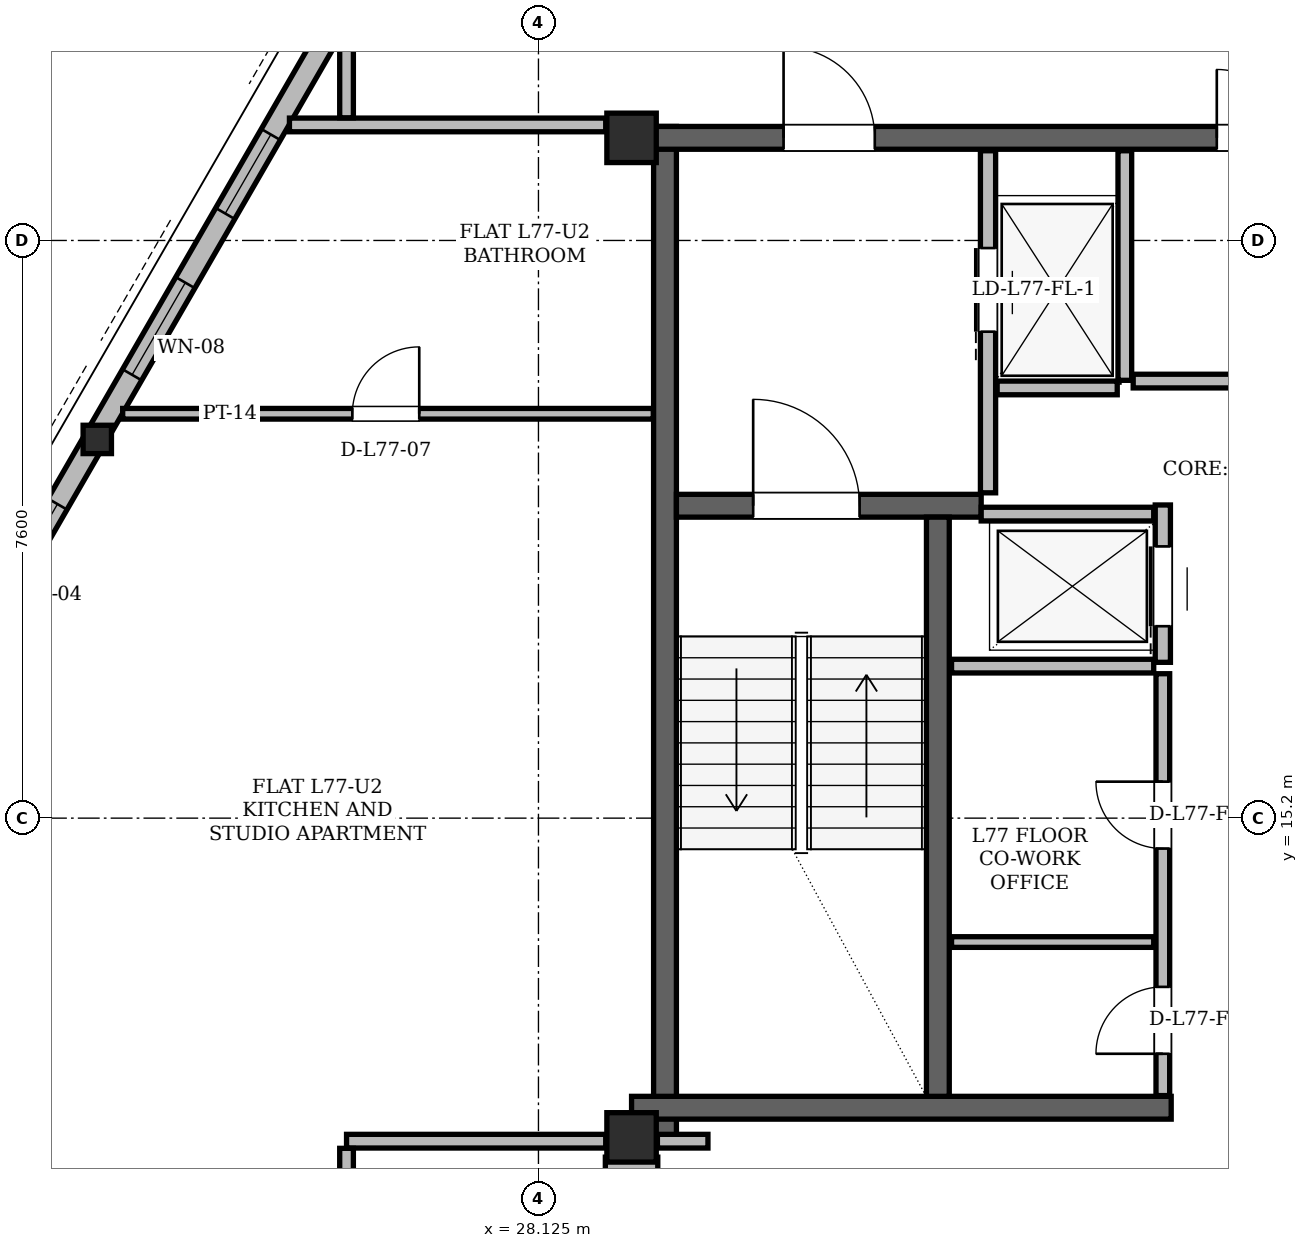
"""IFC4 building model, lengths in metres.
Left out: names, types, materials, properties, quantities, classifications, styles, units other than length and angle.
Written with IfcOpenShell. Run it as: python <this file> out.ifc"""

import sys

from ifc_helpers import new_model, si_unit, direction, frame, frame_2d, origin, origin_2d, place, context, subcontext, project, spatial, rectangle, hollow_rectangle, i_section, extrude, element, fill, save


model = new_model("IFC4")
c1 = context("Model", 3, precision=1e-05, world=origin(), true_north=direction((0.0, 1.0)))
c2 = subcontext(c1, "Body", "Model", "MODEL_VIEW")
j1 = project(units=[si_unit("LENGTHUNIT", "METRE"), si_unit("PLANEANGLEUNIT", "RADIAN")], contexts=[c1])
p1 = place(None, origin())
s1 = spatial("IfcSite", under=j1, at=p1, CompositionType="ELEMENT")
p2 = place(p1, origin())
s2 = spatial("IfcBuilding", under=s1, at=p2, CompositionType="ELEMENT")
p3 = place(p2, frame((0.0, 0.0, 292.8)))
s3 = spatial("IfcBuildingStorey", under=s2, at=p3, CompositionType="ELEMENT", Elevation=292.8)
for number, where, z_axis, x_axis in (
    (1, (29.35, 11.0, 0.0), (0.0, 0.0, 1.0), (1.0, 0.0, 0.0)),
    (2, (29.35, 24.15, 0.0), (0.0, 0.0, 1.0), (1.0, 0.0, 0.0)),
):
    element("IfcColumn", number, at=place(p3, frame(where, z_axis=z_axis, x_axis=x_axis)), inside=s3, PredefinedType="COLUMN", context=c2, shape_type="SweptSolid", body=[
        extrude(hollow_rectangle(XDim=0.65, YDim=0.65, WallThickness=0.05, at=origin_2d()), origin(), (0.0, 0.0, 1.0), 3.9),
    ])
p4 = place(p3, frame((22.298, 20.2, 0.004), z_axis=(0.011543475667, -0.009222233277, 0.999890843334), x_axis=(0.624177092803, 0.781282891672, 0.0)))
e3 = element("IfcColumn", 3, at=p4, inside=s3, PredefinedType="COLUMN", context=c2, shape_type="SweptSolid", body=[
    extrude(i_section(OverallWidth=0.373, OverallDepth=0.373, WebThickness=0.016, FlangeThickness=0.026, at=origin_2d()), origin(), (0.0, 0.0, 1.0), 3.892),
])
p5 = place(p3, frame((29.79, 11.0, 0.0), z_axis=(0.0, 0.0, 1.0), x_axis=(0.0, 1.0, 0.0)))
e4 = element("IfcWall", 4, at=p5, inside=s3, PredefinedType="SHEAR", context=c2, shape_type="SweptSolid", body=[
    extrude(rectangle(XDim=13.3, YDim=0.3, at=frame_2d((6.65, 0.0))), origin(), (0.0, 0.0, 1.0), 3.68),
])
p6 = place(p3, frame((29.35, 11.39, 0.0), z_axis=(0.0, 0.0, 1.0), x_axis=(1.0, 0.0, 0.0)))
e5 = element("IfcWall", 5, at=p6, inside=s3, PredefinedType="SHEAR", context=c2, shape_type="SweptSolid", body=[
    extrude(rectangle(XDim=7.1, YDim=0.3, at=frame_2d((3.55, 0.0))), origin(), (0.0, 0.0, 1.0), 3.68),
])
p7 = place(p3, frame((29.65, 24.15, 0.0), z_axis=(0.0, 0.0, 1.0), x_axis=(1.0, 0.0, 0.0)))
e6 = element("IfcWall", 6, at=p7, inside=s3, PredefinedType="SHEAR", context=c2, shape_type="SweptSolid", body=[
    extrude(rectangle(XDim=15.7, YDim=0.3, at=frame_2d((7.85, 0.0))), origin(), (0.0, 0.0, 1.0), 3.68),
])
p8 = place(p7, frame((1.7, 0.0, 0.0)))
e7 = element("IfcOpeningElement", 7, at=p8, cuts=e6, PredefinedType="OPENING", context=c2, shape_type="SweptSolid", body=[
    extrude(rectangle(XDim=1.2, YDim=2.2, at=frame_2d((0.6, 1.1))), frame((0.0, 0.15, 0.0), z_axis=(0.0, -1.0, 0.0), x_axis=(1.0, 0.0, 0.0)), (0.0, 0.0, 1.0), 0.3),
])
p9 = place(p7, frame((12.8, 0.0, 0.0)))
e8 = element("IfcOpeningElement", 8, at=p9, cuts=e6, PredefinedType="OPENING", context=c2, shape_type="SweptSolid", body=[
    extrude(rectangle(XDim=1.2, YDim=2.2, at=frame_2d((0.6, 1.1))), frame((0.0, 0.15, 0.0), z_axis=(0.0, -1.0, 0.0), x_axis=(1.0, 0.0, 0.0)), (0.0, 0.0, 1.0), 0.3),
])
p10 = place(p7, frame((7.4, 0.0, 0.0)))
e9 = element("IfcOpeningElement", 9, at=p10, cuts=e6, PredefinedType="OPENING", context=c2, shape_type="SweptSolid", body=[
    extrude(rectangle(XDim=0.9, YDim=2.05, at=frame_2d((0.45, 1.025))), frame((0.0, 0.15, 0.0), z_axis=(0.0, -1.0, 0.0), x_axis=(1.0, 0.0, 0.0)), (0.0, 0.0, 1.0), 0.3),
])
p11 = place(p3, frame((29.94, 19.31, 0.0), z_axis=(0.0, 0.0, 1.0), x_axis=(1.0, 0.0, 0.0)))
e10 = element("IfcWall", 10, at=p11, inside=s3, PredefinedType="SHEAR", context=c2, shape_type="SweptSolid", body=[
    extrude(rectangle(XDim=4.01, YDim=0.3, at=frame_2d((2.005, 0.0))), origin(), (0.0, 0.0, 1.0), 3.68),
])
p12 = place(p11, frame((1.01, 0.0, 0.0)))
e11 = element("IfcOpeningElement", 11, at=p12, cuts=e10, PredefinedType="OPENING", context=c2, shape_type="SweptSolid", body=[
    extrude(rectangle(XDim=1.4, YDim=2.2, at=frame_2d((0.7, 1.1))), frame((0.0, 0.15, 0.0), z_axis=(0.0, -1.0, 0.0), x_axis=(1.0, 0.0, 0.0)), (0.0, 0.0, 1.0), 0.3),
])
p13 = place(p3, frame((33.38, 11.54, 0.0), z_axis=(0.0, 0.0, 1.0), x_axis=(0.0, 1.0, 0.0)))
e12 = element("IfcWall", 12, at=p13, inside=s3, PredefinedType="SHEAR", context=c2, shape_type="SweptSolid", body=[
    extrude(rectangle(XDim=7.62, YDim=0.3, at=frame_2d((3.81, 0.0))), origin(), (0.0, 0.0, 1.0), 3.68),
])
p14 = place(p3, frame((35.448, 42.976, 0.0), z_axis=(0.0, 0.0, 1.0), x_axis=(-0.499999767403, -0.866025538074, 0.0)))
e13 = element("IfcWall", 13, at=p14, inside=s3, PredefinedType="SOLIDWALL", context=c2, shape_type="SweptSolid", body=[
    extrude(rectangle(XDim=37.57, YDim=0.29, at=frame_2d((18.785, 0.0))), origin(), (0.0, 0.0, 1.0), 3.058),
])
p15 = place(p14, frame((8.034, 0.0, 0.0)))
e14 = element("IfcOpeningElement", 14, at=p15, cuts=e13, PredefinedType="OPENING", context=c2, shape_type="SweptSolid", body=[
    extrude(rectangle(XDim=1.5, YDim=2.2, at=frame_2d((0.75, 1.1))), frame((0.0, 0.145, 0.0), z_axis=(0.0, -1.0, 0.0), x_axis=(1.0, 0.0, 0.0)), (0.0, 0.0, 1.0), 0.29),
])
p16 = place(p14, frame((32.431, 0.0, 0.0)))
e15 = element("IfcOpeningElement", 15, at=p16, cuts=e13, PredefinedType="OPENING", context=c2, shape_type="SweptSolid", body=[
    extrude(rectangle(XDim=1.5, YDim=2.2, at=frame_2d((0.75, 1.1))), frame((0.0, 0.145, 0.0), z_axis=(0.0, -1.0, 0.0), x_axis=(1.0, 0.0, 0.0)), (0.0, 0.0, 1.0), 0.29),
])
p17 = place(p14, frame((27.302, 0.0, 0.85)))
e16 = element("IfcOpeningElement", 16, at=p17, cuts=e13, PredefinedType="OPENING", context=c2, shape_type="SweptSolid", body=[
    extrude(rectangle(XDim=2.2, YDim=1.85, at=frame_2d((1.1, 0.925))), frame((0.0, 0.145, 0.0), z_axis=(0.0, -1.0, 0.0), x_axis=(1.0, 0.0, 0.0)), (0.0, 0.0, 1.0), 0.29),
])
p18 = place(p14, frame((34.367, 0.0, 0.85)))
e17 = element("IfcOpeningElement", 17, at=p18, cuts=e13, PredefinedType="OPENING", context=c2, shape_type="SweptSolid", body=[
    extrude(rectangle(XDim=1.6, YDim=1.7, at=frame_2d((0.8, 0.85))), frame((0.0, 0.145, 0.0), z_axis=(0.0, -1.0, 0.0), x_axis=(1.0, 0.0, 0.0)), (0.0, 0.0, 1.0), 0.29),
])
p19 = place(p14, frame((21.688, 0.0, 0.85)))
e18 = element("IfcOpeningElement", 18, at=p19, cuts=e13, PredefinedType="OPENING", context=c2, shape_type="SweptSolid", body=[
    extrude(rectangle(XDim=1.2, YDim=1.48, at=frame_2d((0.6, 0.74))), frame((0.0, 0.145, 0.0), z_axis=(0.0, -1.0, 0.0), x_axis=(1.0, 0.0, 0.0)), (0.0, 0.0, 1.0), 0.29),
])
p20 = place(p14, frame((23.938, 0.0, 0.85)))
e19 = element("IfcOpeningElement", 19, at=p20, cuts=e13, PredefinedType="OPENING", context=c2, shape_type="SweptSolid", body=[
    extrude(rectangle(XDim=1.4, YDim=1.6, at=frame_2d((0.7, 0.8))), frame((0.0, 0.145, 0.0), z_axis=(0.0, -1.0, 0.0), x_axis=(1.0, 0.0, 0.0)), (0.0, 0.0, 1.0), 0.29),
])
p21 = place(p14, frame((15.363, 0.0, 0.85)))
e20 = element("IfcOpeningElement", 20, at=p21, cuts=e13, PredefinedType="OPENING", context=c2, shape_type="SweptSolid", body=[
    extrude(rectangle(XDim=2.4, YDim=1.9, at=frame_2d((1.2, 0.95))), frame((0.0, 0.145, 0.0), z_axis=(0.0, -1.0, 0.0), x_axis=(1.0, 0.0, 0.0)), (0.0, 0.0, 1.0), 0.29),
])
p22 = place(p14, frame((1.165, 0.0, 0.85)))
e21 = element("IfcOpeningElement", 21, at=p22, cuts=e13, PredefinedType="OPENING", context=c2, shape_type="SweptSolid", body=[
    extrude(rectangle(XDim=1.2, YDim=1.48, at=frame_2d((0.6, 0.74))), frame((0.0, 0.145, 0.0), z_axis=(0.0, -1.0, 0.0), x_axis=(1.0, 0.0, 0.0)), (0.0, 0.0, 1.0), 0.29),
])
p23 = place(p3, frame((34.04, 19.48, 0.0), z_axis=(0.0, 0.0, 1.0), x_axis=(0.0, 1.0, 0.0)))
e22 = element("IfcWall", 22, at=p23, inside=s3, PredefinedType="PARTITIONING", context=c2, shape_type="SweptSolid", body=[
    extrude(rectangle(XDim=4.5, YDim=0.2, at=frame_2d((2.25, 0.0))), origin(), (0.0, 0.0, 1.0), 3.68),
])
p24 = place(p23, frame((2.12, 0.0, 0.0)))
e23 = element("IfcOpeningElement", 23, at=p24, cuts=e22, PredefinedType="OPENING", context=c2, shape_type="SweptSolid", body=[
    extrude(rectangle(XDim=1.1, YDim=2.2, at=frame_2d((0.55, 1.1))), frame((0.0, 0.1, 0.0), z_axis=(0.0, -1.0, 0.0), x_axis=(1.0, 0.0, 0.0)), (0.0, 0.0, 1.0), 0.2),
])
p25 = place(p3, frame((35.84, 20.96, 0.0), z_axis=(0.0, 0.0, 1.0), x_axis=(0.0, 1.0, 0.0)))
e24 = element("IfcWall", 24, at=p25, inside=s3, PredefinedType="PARTITIONING", context=c2, shape_type="SweptSolid", body=[
    extrude(rectangle(XDim=3.02, YDim=0.18, at=frame_2d((1.51, 0.0))), origin(), (0.0, 0.0, 1.0), 3.68),
])
p26 = place(p3, frame((34.16, 20.86, 0.0), z_axis=(0.0, 0.0, 1.0), x_axis=(1.0, 0.0, 0.0)))
e25 = element("IfcWall", 25, at=p26, inside=s3, PredefinedType="PARTITIONING", context=c2, shape_type="SweptSolid", body=[
    extrude(rectangle(XDim=1.58, YDim=0.18, at=frame_2d((0.79, 0.0))), origin(), (0.0, 0.0, 1.0), 3.68),
])
p27 = place(p3, frame((36.34, 17.25, 0.0), z_axis=(0.0, 0.0, 1.0), x_axis=(0.0, 1.0, 0.0)))
e26 = element("IfcWall", 26, at=p27, inside=s3, PredefinedType="PARTITIONING", context=c2, shape_type="SweptSolid", body=[
    extrude(rectangle(XDim=2.07, YDim=0.2, at=frame_2d((1.035, 0.0))), origin(), (0.0, 0.0, 1.0), 3.68),
])
p28 = place(p27, frame((0.475, 0.0, 0.0)))
e27 = element("IfcOpeningElement", 27, at=p28, cuts=e26, PredefinedType="OPENING", context=c2, shape_type="SweptSolid", body=[
    extrude(rectangle(XDim=1.05, YDim=2.15, at=frame_2d((0.525, 1.075))), frame((0.0, 0.1, 0.0), z_axis=(0.0, -1.0, 0.0), x_axis=(1.0, 0.0, 0.0)), (0.0, 0.0, 1.0), 0.2),
])
p29 = place(p3, frame((33.95, 19.2, 0.0), z_axis=(0.0, 0.0, 1.0), x_axis=(1.0, 0.0, 0.0)))
e28 = element("IfcWall", 28, at=p29, inside=s3, PredefinedType="PARTITIONING", context=c2, shape_type="SweptSolid", body=[
    extrude(rectangle(XDim=2.27, YDim=0.18, at=frame_2d((1.135, 0.0))), origin(), (0.0, 0.0, 1.0), 3.68),
])
p30 = place(p3, frame((33.56, 17.2, 0.0), z_axis=(0.0, 0.0, 1.0), x_axis=(1.0, 0.0, 0.0)))
e29 = element("IfcWall", 29, at=p30, inside=s3, PredefinedType="PARTITIONING", context=c2, shape_type="SweptSolid", body=[
    extrude(rectangle(XDim=2.66, YDim=0.18, at=frame_2d((1.33, 0.0))), origin(), (0.0, 0.0, 1.0), 3.68),
])
p31 = place(p3, frame((36.34, 11.55, 0.0), z_axis=(0.0, 0.0, 1.0), x_axis=(0.0, 1.0, 0.0)))
e30 = element("IfcWall", 30, at=p31, inside=s3, PredefinedType="PARTITIONING", context=c2, shape_type="SweptSolid", body=[
    extrude(rectangle(XDim=5.55, YDim=0.18, at=frame_2d((2.775, 0.0))), origin(), (0.0, 0.0, 1.0), 3.68),
])
p32 = place(p31, frame((0.55, 0.0, 0.0)))
e31 = element("IfcOpeningElement", 31, at=p32, cuts=e30, PredefinedType="OPENING", context=c2, shape_type="SweptSolid", body=[
    extrude(rectangle(XDim=0.88, YDim=2.08, at=frame_2d((0.44, 1.04))), frame((0.0, 0.09, 0.0), z_axis=(0.0, -1.0, 0.0), x_axis=(1.0, 0.0, 0.0)), (0.0, 0.0, 1.0), 0.18),
])
p33 = place(p31, frame((3.25, 0.0, 0.0)))
e32 = element("IfcOpeningElement", 32, at=p33, cuts=e30, PredefinedType="OPENING", context=c2, shape_type="SweptSolid", body=[
    extrude(rectangle(XDim=0.88, YDim=2.08, at=frame_2d((0.44, 1.04))), frame((0.0, 0.09, 0.0), z_axis=(0.0, -1.0, 0.0), x_axis=(1.0, 0.0, 0.0)), (0.0, 0.0, 1.0), 0.18),
])
p34 = place(p3, frame((33.56, 13.57, 0.0), z_axis=(0.0, 0.0, 1.0), x_axis=(1.0, 0.0, 0.0)))
e33 = element("IfcWall", 33, at=p34, inside=s3, PredefinedType="PARTITIONING", context=c2, shape_type="SweptSolid", body=[
    extrude(rectangle(XDim=2.66, YDim=0.14, at=frame_2d((1.33, 0.0))), origin(), (0.0, 0.0, 1.0), 3.68),
])
p35 = place(p3, frame((35.95, 20.95, 0.0), z_axis=(0.0, 0.0, 1.0), x_axis=(1.0, 0.0, 0.0)))
e34 = element("IfcWall", 34, at=p35, inside=s3, PredefinedType="PARTITIONING", context=c2, shape_type="SweptSolid", body=[
    extrude(rectangle(XDim=3.1, YDim=0.18, at=frame_2d((1.55, 0.0))), origin(), (0.0, 0.0, 1.0), 3.68),
])
p36 = place(p3, frame((29.005, 10.65, 0.0), z_axis=(0.0, 0.0, 1.0), x_axis=(1.0, 0.0, 0.0)))
e35 = element("IfcWall", 35, at=p36, inside=s3, PredefinedType="PARTITIONING", context=c2, shape_type="SweptSolid", body=[
    extrude(rectangle(XDim=0.69, YDim=0.18, at=frame_2d((0.345, 0.0))), origin(), (0.0, 0.0, 1.0), 3.68),
])
p37 = place(p3, frame((25.6, 10.95, 0.0), z_axis=(0.0, 0.0, 1.0), x_axis=(1.0, 0.0, 0.0)))
e36 = element("IfcWall", 36, at=p37, inside=s3, PredefinedType="PARTITIONING", context=c2, shape_type="SweptSolid", body=[
    extrude(rectangle(XDim=3.41, YDim=0.18, at=frame_2d((1.705, 0.0))), origin(), (0.0, 0.0, 1.0), 3.266),
])
p38 = place(p3, frame((29.69, 10.95, 0.0), z_axis=(0.0, 0.0, 1.0), x_axis=(1.0, 0.0, 0.0)))
e37 = element("IfcWall", 37, at=p38, inside=s3, PredefinedType="PARTITIONING", context=c2, shape_type="SweptSolid", body=[
    extrude(rectangle(XDim=0.665, YDim=0.18, at=frame_2d((0.333, 0.0))), origin(), (0.0, 0.0, 1.0), 2.82),
])
p39 = place(p3, frame((22.655, 20.52, 0.0), z_axis=(0.0, 0.0, 1.0), x_axis=(1.0, 0.0, 0.0)))
e38 = element("IfcWall", 38, at=p39, inside=s3, PredefinedType="PARTITIONING", context=c2, shape_type="SweptSolid", body=[
    extrude(rectangle(XDim=6.981, YDim=0.14, at=frame_2d((3.491, 0.0))), origin(), (0.0, 0.0, 1.0), 2.82),
])
p40 = place(p39, frame((3.022, 0.0, 0.0)))
e39 = element("IfcOpeningElement", 39, at=p40, cuts=e38, PredefinedType="OPENING", context=c2, shape_type="SweptSolid", body=[
    extrude(rectangle(XDim=0.88, YDim=2.08, at=frame_2d((0.44, 1.04))), frame((0.0, 0.07, 0.0), z_axis=(0.0, -1.0, 0.0), x_axis=(1.0, 0.0, 0.0)), (0.0, 0.0, 1.0), 0.14),
])
p41 = place(p3, frame((24.849, 24.32, 0.0), z_axis=(0.0, 0.0, 1.0), x_axis=(1.0, 0.0, 0.0)))
e40 = element("IfcWall", 40, at=p41, inside=s3, PredefinedType="PARTITIONING", context=c2, shape_type="SweptSolid", body=[
    extrude(rectangle(XDim=4.161, YDim=0.18, at=frame_2d((2.081, 0.0))), origin(), (0.0, 0.0, 1.0), 3.68),
])
p42 = place(p3, frame((25.6, 9.394, 0.0), z_axis=(0.0, 0.0, 1.0), x_axis=(0.0, 1.0, 0.0)))
e41 = element("IfcWall", 41, at=p42, inside=s3, PredefinedType="PARTITIONING", context=c2, shape_type="SweptSolid", body=[
    extrude(rectangle(XDim=1.462, YDim=0.18, at=frame_2d((0.731, 0.0))), origin(), (0.0, 0.0, 1.0), 3.266),
])
p43 = place(p3, frame((25.6, 24.414, 0.0), z_axis=(0.0, 0.0, 1.0), x_axis=(0.0, 1.0, 0.0)))
e42 = element("IfcWall", 42, at=p43, inside=s3, PredefinedType="PARTITIONING", context=c2, shape_type="SweptSolid", body=[
    extrude(rectangle(XDim=1.207, YDim=0.18, at=frame_2d((0.604, 0.0))), origin(), (0.0, 0.0, 1.0), 3.058),
])
p44 = place(p17, origin())
e43 = element("IfcWindow", 43, at=p44, inside=s3, PartitioningType="SINGLE_PANEL", PredefinedType="WINDOW", context=c2, shape_type="SweptSolid", body=[
    extrude(rectangle(XDim=2.2, YDim=1.85, at=frame_2d((1.1, 0.925))), frame((0.0, 0.03, 0.0), z_axis=(0.0, -1.0, 0.0), x_axis=(1.0, 0.0, 0.0)), (0.0, 0.0, 1.0), 0.06),
])
fill(e16, e43)
p45 = place(p19, origin())
e44 = element("IfcWindow", 44, at=p45, inside=s3, PartitioningType="SINGLE_PANEL", PredefinedType="WINDOW", context=c2, shape_type="SweptSolid", body=[
    extrude(rectangle(XDim=1.2, YDim=1.48, at=frame_2d((0.6, 0.74))), frame((0.0, 0.03, 0.0), z_axis=(0.0, -1.0, 0.0), x_axis=(1.0, 0.0, 0.0)), (0.0, 0.0, 1.0), 0.06),
])
fill(e18, e44)
p46 = place(p20, origin())
e45 = element("IfcWindow", 45, at=p46, inside=s3, PartitioningType="SINGLE_PANEL", PredefinedType="WINDOW", context=c2, shape_type="SweptSolid", body=[
    extrude(rectangle(XDim=1.4, YDim=1.6, at=frame_2d((0.7, 0.8))), frame((0.0, 0.03, 0.0), z_axis=(0.0, -1.0, 0.0), x_axis=(1.0, 0.0, 0.0)), (0.0, 0.0, 1.0), 0.06),
])
fill(e19, e45)
p47 = place(p32, origin())
e46 = element("IfcDoor", 46, at=p47, inside=s3, OperationType="SINGLE_SWING_LEFT", PredefinedType="DOOR", context=c2, shape_type="SweptSolid", body=[
    extrude(rectangle(XDim=0.88, YDim=2.08, at=frame_2d((0.44, 1.04))), frame((0.0, 0.025, 0.0), z_axis=(0.0, -1.0, 0.0), x_axis=(1.0, 0.0, 0.0)), (0.0, 0.0, 1.0), 0.05),
])
fill(e31, e46)
p48 = place(p33, origin())
e47 = element("IfcDoor", 47, at=p48, inside=s3, OperationType="SINGLE_SWING_RIGHT", PredefinedType="DOOR", context=c2, shape_type="SweptSolid", body=[
    extrude(rectangle(XDim=0.88, YDim=2.08, at=frame_2d((0.44, 1.04))), frame((0.0, 0.025, 0.0), z_axis=(0.0, -1.0, 0.0), x_axis=(1.0, 0.0, 0.0)), (0.0, 0.0, 1.0), 0.05),
])
fill(e32, e47)
p49 = place(p24, origin())
e48 = element("IfcDoor", 48, at=p49, inside=s3, OperationType="SLIDING_TO_LEFT", PredefinedType="DOOR", context=c2, shape_type="SweptSolid", body=[
    extrude(rectangle(XDim=1.1, YDim=2.2, at=frame_2d((0.55, 1.1))), frame((0.0, 0.025, 0.0), z_axis=(0.0, -1.0, 0.0), x_axis=(1.0, 0.0, 0.0)), (0.0, 0.0, 1.0), 0.05),
])
fill(e23, e48)
p50 = place(p28, origin())
e49 = element("IfcDoor", 49, at=p50, inside=s3, OperationType="SLIDING_TO_LEFT", PredefinedType="DOOR", context=c2, shape_type="SweptSolid", body=[
    extrude(rectangle(XDim=1.05, YDim=2.15, at=frame_2d((0.525, 1.075))), frame((0.0, 0.025, 0.0), z_axis=(0.0, -1.0, 0.0), x_axis=(1.0, 0.0, 0.0)), (0.0, 0.0, 1.0), 0.05),
])
fill(e27, e49)
p51 = place(p12, origin())
e50 = element("IfcDoor", 50, at=p51, inside=s3, OperationType="SINGLE_SWING_LEFT", PredefinedType="DOOR", context=c2, shape_type="SweptSolid", body=[
    extrude(rectangle(XDim=1.4, YDim=2.2, at=frame_2d((0.7, 1.1))), frame((0.0, 0.025, 0.0), z_axis=(0.0, -1.0, 0.0), x_axis=(1.0, 0.0, 0.0)), (0.0, 0.0, 1.0), 0.05),
])
fill(e11, e50)
p52 = place(p8, origin())
e51 = element("IfcDoor", 51, at=p52, inside=s3, OperationType="SINGLE_SWING_LEFT", PredefinedType="DOOR", context=c2, shape_type="SweptSolid", body=[
    extrude(rectangle(XDim=1.2, YDim=2.2, at=frame_2d((0.6, 1.1))), frame((0.0, 0.025, 0.0), z_axis=(0.0, -1.0, 0.0), x_axis=(1.0, 0.0, 0.0)), (0.0, 0.0, 1.0), 0.05),
])
fill(e7, e51)
p53 = place(p10, origin())
e52 = element("IfcDoor", 52, at=p53, inside=s3, OperationType="SINGLE_SWING_LEFT", PredefinedType="DOOR", context=c2, shape_type="SweptSolid", body=[
    extrude(rectangle(XDim=0.9, YDim=2.05, at=frame_2d((0.45, 1.025))), frame((0.0, 0.025, 0.0), z_axis=(0.0, -1.0, 0.0), x_axis=(1.0, 0.0, 0.0)), (0.0, 0.0, 1.0), 0.05),
])
fill(e9, e52)
p54 = place(p40, origin())
e53 = element("IfcDoor", 53, at=p54, inside=s3, OperationType="SINGLE_SWING_RIGHT", PredefinedType="DOOR", context=c2, shape_type="SweptSolid", body=[
    extrude(rectangle(XDim=0.88, YDim=2.08, at=frame_2d((0.44, 1.04))), frame((0.0, 0.025, 0.0), z_axis=(0.0, -1.0, 0.0), x_axis=(1.0, 0.0, 0.0)), (0.0, 0.0, 1.0), 0.05),
])
fill(e39, e53)
save(model, sys.argv[1])
